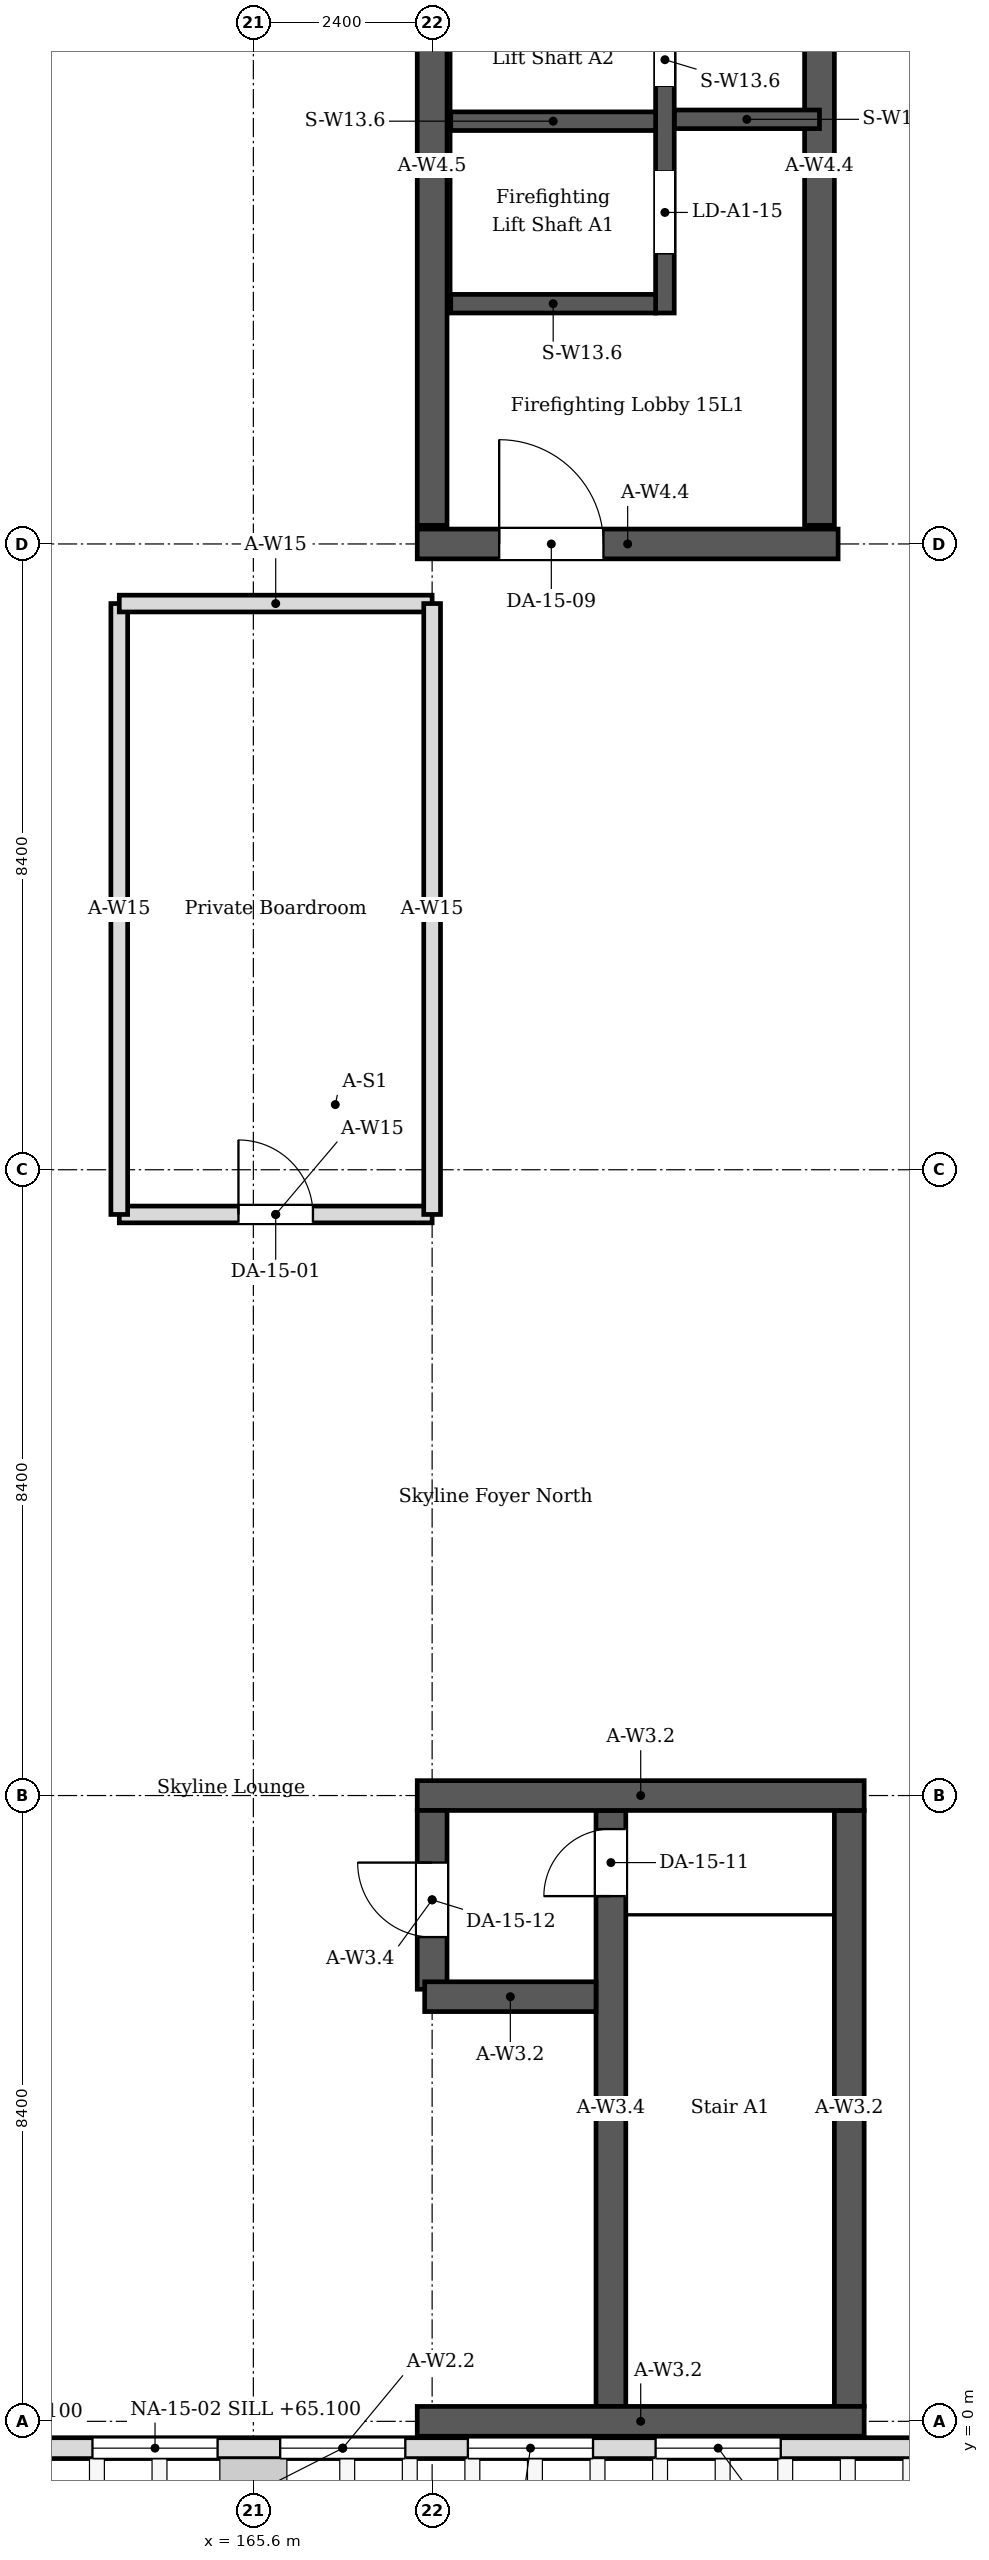
"""IFC4 building model, lengths in metres.
Left out: names, types, materials, properties, quantities, classifications, styles, units other than length and angle.
Written with IfcOpenShell. Run it as: python <this file> out.ifc"""

import sys

from ifc_helpers import new_model, si_unit, direction, frame, frame_2d, origin, place, context, subcontext, project, spatial, polyline, rectangle, outline, extrude, element, fill, save


model = new_model("IFC4")
c1 = context("Model", 3, precision=1e-05, world=origin(), true_north=direction((0.0, 1.0)))
c2 = subcontext(c1, "Body", "Model", "MODEL_VIEW")
j1 = project(units=[si_unit("LENGTHUNIT", "METRE"), si_unit("PLANEANGLEUNIT", "RADIAN")], contexts=[c1])
p1 = place(None, origin())
s1 = spatial("IfcSite", under=j1, at=p1, CompositionType="ELEMENT")
p2 = place(p1, origin())
s2 = spatial("IfcBuilding", under=s1, at=p2, CompositionType="ELEMENT")
p3 = place(p2, frame((0.0, 0.0, 64.8)))
s3 = spatial("IfcBuildingStorey", under=s2, at=p3, CompositionType="ELEMENT", Elevation=64.8)
p4 = place(p3, frame((157.0, -0.36, 0.0), z_axis=(0.0, 0.0, 1.0), x_axis=(1.0, 0.0, 0.0)))
e1 = element("IfcWall", 1, at=p4, inside=s3, PredefinedType="SOLIDWALL", context=c2, shape_type="SweptSolid", body=[
    extrude(outline(polyline([(0.0, 0.0), (19.6, 0.0), (19.6, 0.092), (17.967, 1.79), (16.333, 3.488), (14.7, 5.186), (13.067, 6.884), (11.433, 8.582), (9.8, 10.28), (8.167, 8.582), (6.533, 6.884), (4.9, 5.186), (3.267, 3.488), (1.633, 1.79), (0.0, 0.092), (0.0, 0.0)])), frame((0.0, 0.14, 0.0), z_axis=(0.0, -1.0, 0.0), x_axis=(1.0, 0.0, 0.0)), (0.0, 0.0, 1.0), 0.28),
])
p5 = place(p4, frame((3.92, 0.0, 0.3)))
e2 = element("IfcOpeningElement", 2, at=p5, cuts=e1, PredefinedType="OPENING", context=c2, shape_type="SweptSolid", body=[
    extrude(rectangle(XDim=1.68, YDim=3.5, at=frame_2d((0.84, 1.75))), frame((0.0, 0.15, 0.0), z_axis=(0.0, -1.0, 0.0), x_axis=(1.0, 0.0, 0.0)), (0.0, 0.0, 1.0), 0.3),
])
p6 = place(p4, frame((6.44, 0.0, 0.3)))
e3 = element("IfcOpeningElement", 3, at=p6, cuts=e1, PredefinedType="OPENING", context=c2, shape_type="SweptSolid", body=[
    extrude(rectangle(XDim=1.68, YDim=6.1, at=frame_2d((0.84, 3.05))), frame((0.0, 0.15, 0.0), z_axis=(0.0, -1.0, 0.0), x_axis=(1.0, 0.0, 0.0)), (0.0, 0.0, 1.0), 0.3),
])
p7 = place(p4, frame((8.96, 0.0, 0.3)))
e4 = element("IfcOpeningElement", 4, at=p7, cuts=e1, PredefinedType="OPENING", context=c2, shape_type="SweptSolid", body=[
    extrude(rectangle(XDim=1.68, YDim=8.8, at=frame_2d((0.84, 4.4))), frame((0.0, 0.15, 0.0), z_axis=(0.0, -1.0, 0.0), x_axis=(1.0, 0.0, 0.0)), (0.0, 0.0, 1.0), 0.3),
])
p8 = place(p4, frame((11.48, 0.0, 0.3)))
e5 = element("IfcOpeningElement", 5, at=p8, cuts=e1, PredefinedType="OPENING", context=c2, shape_type="SweptSolid", body=[
    extrude(rectangle(XDim=1.68, YDim=6.1, at=frame_2d((0.84, 3.05))), frame((0.0, 0.15, 0.0), z_axis=(0.0, -1.0, 0.0), x_axis=(1.0, 0.0, 0.0)), (0.0, 0.0, 1.0), 0.3),
])
p9 = place(p4, frame((14.0, 0.0, 0.3)))
e6 = element("IfcOpeningElement", 6, at=p9, cuts=e1, PredefinedType="OPENING", context=c2, shape_type="SweptSolid", body=[
    extrude(rectangle(XDim=1.68, YDim=3.5, at=frame_2d((0.84, 1.75))), frame((0.0, 0.15, 0.0), z_axis=(0.0, -1.0, 0.0), x_axis=(1.0, 0.0, 0.0)), (0.0, 0.0, 1.0), 0.3),
])
p10 = place(p3, frame((163.8, 16.2, 0.0), z_axis=(0.0, 0.0, 1.0), x_axis=(1.0, 0.0, 0.0)))
e7 = element("IfcWall", 7, at=p10, inside=s3, PredefinedType="PARTITIONING", context=c2, shape_type="SweptSolid", body=[
    extrude(rectangle(XDim=4.2, YDim=0.225, at=frame_2d((2.1, 0.0))), origin(), (0.0, 0.0, 1.0), 6.14),
])
p11 = place(p10, frame((1.6, 0.0, 0.0)))
e8 = element("IfcOpeningElement", 8, at=p11, cuts=e7, PredefinedType="OPENING", context=c2, shape_type="SweptSolid", body=[
    extrude(rectangle(XDim=1.0, YDim=2.1, at=frame_2d((0.5, 1.05))), frame((0.0, 0.123, 0.0), z_axis=(0.0, -1.0, 0.0), x_axis=(1.0, 0.0, 0.0)), (0.0, 0.0, 1.0), 0.245),
])
p12 = place(p3, frame((163.8, 16.2, 0.0), z_axis=(0.0, 0.0, 1.0), x_axis=(0.0, 1.0, 0.0)))
e9 = element("IfcWall", 9, at=p12, inside=s3, PredefinedType="PARTITIONING", context=c2, shape_type="SweptSolid", body=[
    extrude(rectangle(XDim=8.2, YDim=0.225, at=frame_2d((4.1, 0.0))), origin(), (0.0, 0.0, 1.0), 6.14),
])
p13 = place(p3, frame((163.8, 24.4, 0.0), z_axis=(0.0, 0.0, 1.0), x_axis=(1.0, 0.0, 0.0)))
e10 = element("IfcWall", 10, at=p13, inside=s3, PredefinedType="PARTITIONING", context=c2, shape_type="SweptSolid", body=[
    extrude(rectangle(XDim=4.2, YDim=0.225, at=frame_2d((2.1, 0.0))), origin(), (0.0, 0.0, 1.0), 6.14),
])
p14 = place(p3, frame((168.0, 16.2, 0.0), z_axis=(0.0, 0.0, 1.0), x_axis=(0.0, 1.0, 0.0)))
e11 = element("IfcWall", 11, at=p14, inside=s3, PredefinedType="PARTITIONING", context=c2, shape_type="SweptSolid", body=[
    extrude(rectangle(XDim=8.2, YDim=0.225, at=frame_2d((4.1, 0.0))), origin(), (0.0, 0.0, 1.0), 6.14),
])
p15 = place(p3, frame((167.8, 25.2, 0.0), z_axis=(0.0, 0.0, 1.0), x_axis=(1.0, 0.0, 0.0)))
e12 = element("IfcWall", 12, at=p15, inside=s3, PredefinedType="SOLIDWALL", context=c2, shape_type="SweptSolid", body=[
    extrude(rectangle(XDim=5.65, YDim=0.4, at=frame_2d((2.825, 0.0))), origin(), (0.0, 0.0, 1.0), 2.497),
])
p16 = place(p15, frame((1.1, 0.0, 0.0)))
e13 = element("IfcOpeningElement", 13, at=p16, cuts=e12, PredefinedType="OPENING", context=c2, shape_type="SweptSolid", body=[
    extrude(rectangle(XDim=1.4, YDim=2.1, at=frame_2d((0.7, 1.05))), frame((0.0, 0.21, 0.0), z_axis=(0.0, -1.0, 0.0), x_axis=(1.0, 0.0, 0.0)), (0.0, 0.0, 1.0), 0.42),
])
p17 = place(p3, frame((168.0, 25.45, 0.0), z_axis=(0.0, 0.0, 1.0), x_axis=(0.0, 1.0, 0.0)))
e14 = element("IfcWall", 14, at=p17, inside=s3, PredefinedType="SOLIDWALL", context=c2, shape_type="SweptSolid", body=[
    extrude(rectangle(XDim=16.3, YDim=0.4, at=frame_2d((8.15, 0.0))), origin(), (0.0, 0.0, 1.0), 4.324),
])
p18 = place(p3, frame((173.2, 25.45, 0.0), z_axis=(0.0, 0.0, 1.0), x_axis=(0.0, 1.0, 0.0)))
e15 = element("IfcWall", 15, at=p18, inside=s3, PredefinedType="SOLIDWALL", context=c2, shape_type="SweptSolid", body=[
    extrude(rectangle(XDim=16.3, YDim=0.4, at=frame_2d((8.15, 0.0))), origin(), (0.0, 0.0, 1.0), 2.497),
])
p19 = place(p3, frame((171.25, 30.9, 0.0), z_axis=(0.0, 0.0, 1.0), x_axis=(1.0, 0.0, 0.0)))
e16 = element("IfcWall", 16, at=p19, inside=s3, PredefinedType="SOLIDWALL", context=c2, shape_type="SweptSolid", body=[
    extrude(rectangle(XDim=1.95, YDim=0.25, at=frame_2d((0.975, 0.0))), origin(), (0.0, 0.0, 1.0), 2.497),
])
p20 = place(p3, frame((171.125, 28.3, 0.0), z_axis=(0.0, 0.0, 1.0), x_axis=(0.0, 1.0, 0.0)))
e17 = element("IfcWall", 17, at=p20, inside=s3, PredefinedType="SOLIDWALL", context=c2, shape_type="SweptSolid", body=[
    extrude(rectangle(XDim=10.9, YDim=0.25, at=frame_2d((5.45, 0.0))), origin(), (0.0, 0.0, 1.0), 4.324),
])
p21 = place(p20, frame((0.8, 0.0, 0.0)))
e18 = element("IfcOpeningElement", 18, at=p21, cuts=e17, PredefinedType="OPENING", context=c2, shape_type="SweptSolid", body=[
    extrude(rectangle(XDim=1.1, YDim=2.1, at=frame_2d((0.55, 1.05))), frame((0.0, 0.135, 0.0), z_axis=(0.0, -1.0, 0.0), x_axis=(1.0, 0.0, 0.0)), (0.0, 0.0, 1.0), 0.27),
])
p22 = place(p20, frame((3.05, 0.0, 0.0)))
e19 = element("IfcOpeningElement", 19, at=p22, cuts=e17, PredefinedType="OPENING", context=c2, shape_type="SweptSolid", body=[
    extrude(rectangle(XDim=1.1, YDim=2.1, at=frame_2d((0.55, 1.05))), frame((0.0, 0.135, 0.0), z_axis=(0.0, -1.0, 0.0), x_axis=(1.0, 0.0, 0.0)), (0.0, 0.0, 1.0), 0.27),
])
p23 = place(p20, frame((5.1, 0.0, 0.0)))
e20 = element("IfcOpeningElement", 20, at=p23, cuts=e17, PredefinedType="OPENING", context=c2, shape_type="SweptSolid", body=[
    extrude(rectangle(XDim=1.1, YDim=2.1, at=frame_2d((0.55, 1.05))), frame((0.0, 0.135, 0.0), z_axis=(0.0, -1.0, 0.0), x_axis=(1.0, 0.0, 0.0)), (0.0, 0.0, 1.0), 0.27),
])
p24 = place(p20, frame((7.15, 0.0, 0.0)))
e21 = element("IfcOpeningElement", 21, at=p24, cuts=e17, PredefinedType="OPENING", context=c2, shape_type="SweptSolid", body=[
    extrude(rectangle(XDim=1.1, YDim=2.1, at=frame_2d((0.55, 1.05))), frame((0.0, 0.135, 0.0), z_axis=(0.0, -1.0, 0.0), x_axis=(1.0, 0.0, 0.0)), (0.0, 0.0, 1.0), 0.27),
])
p25 = place(p20, frame((9.2, 0.0, 0.0)))
e22 = element("IfcOpeningElement", 22, at=p25, cuts=e17, PredefinedType="OPENING", context=c2, shape_type="SweptSolid", body=[
    extrude(rectangle(XDim=1.1, YDim=2.1, at=frame_2d((0.55, 1.05))), frame((0.0, 0.135, 0.0), z_axis=(0.0, -1.0, 0.0), x_axis=(1.0, 0.0, 0.0)), (0.0, 0.0, 1.0), 0.27),
])
for number, where, z_axis, x_axis in (
    (23, (168.25, 28.425, 0.0), (0.0, 0.0, 1.0), (1.0, 0.0, 0.0)),
    (24, (168.25, 30.875, 0.0), (0.0, 0.0, 1.0), (1.0, 0.0, 0.0)),
):
    element("IfcWall", number, at=place(p3, frame(where, z_axis=z_axis, x_axis=x_axis)), inside=s3, PredefinedType="SOLIDWALL", context=c2, shape_type="SweptSolid", body=[
        extrude(rectangle(XDim=2.75, YDim=0.25, at=frame_2d((1.375, 0.0))), origin(), (0.0, 0.0, 1.0), 4.324),
    ])
p26 = place(p3, frame((170.4, 0.2, 0.0), z_axis=(0.0, 0.0, 1.0), x_axis=(0.0, 1.0, 0.0)))
e25 = element("IfcWall", 25, at=p26, inside=s3, PredefinedType="SOLIDWALL", context=c2, shape_type="SweptSolid", body=[
    extrude(rectangle(XDim=8.0, YDim=0.4, at=frame_2d((4.0, 0.0))), origin(), (0.0, 0.0, 1.0), 5.2),
])
p27 = place(p26, frame((6.85, 0.0, 0.0)))
e26 = element("IfcOpeningElement", 26, at=p27, cuts=e25, PredefinedType="OPENING", context=c2, shape_type="SweptSolid", body=[
    extrude(rectangle(XDim=0.9, YDim=2.1, at=frame_2d((0.45, 1.05))), frame((0.0, 0.21, 0.0), z_axis=(0.0, -1.0, 0.0), x_axis=(1.0, 0.0, 0.0)), (0.0, 0.0, 1.0), 0.42),
])
p28 = place(p3, frame((173.6, 0.2, 0.0), z_axis=(0.0, 0.0, 1.0), x_axis=(0.0, 1.0, 0.0)))
e27 = element("IfcWall", 27, at=p28, inside=s3, PredefinedType="SOLIDWALL", context=c2, shape_type="SweptSolid", body=[
    extrude(rectangle(XDim=8.0, YDim=0.4, at=frame_2d((4.0, 0.0))), origin(), (0.0, 0.0, 1.0), 1.873),
])
for number, where, z_axis, x_axis in (
    (28, (167.8, 0.0, 0.0), (0.0, 0.0, 1.0), (1.0, 0.0, 0.0)),
    (29, (167.8, 8.4, 0.0), (0.0, 0.0, 1.0), (1.0, 0.0, 0.0)),
):
    element("IfcWall", number, at=place(p3, frame(where, z_axis=z_axis, x_axis=x_axis)), inside=s3, PredefinedType="SOLIDWALL", context=c2, shape_type="SweptSolid", body=[
        extrude(rectangle(XDim=6.0, YDim=0.4, at=frame_2d((3.0, 0.0))), origin(), (0.0, 0.0, 1.0), 1.873),
    ])
p29 = place(p3, frame((168.0, 5.8, 0.0), z_axis=(0.0, 0.0, 1.0), x_axis=(0.0, 1.0, 0.0)))
e30 = element("IfcWall", 30, at=p29, inside=s3, PredefinedType="SOLIDWALL", context=c2, shape_type="SweptSolid", body=[
    extrude(rectangle(XDim=2.4, YDim=0.4, at=frame_2d((1.2, 0.0))), origin(), (0.0, 0.0, 1.0), 5.2),
])
p30 = place(p29, frame((0.7, 0.0, 0.0)))
e31 = element("IfcOpeningElement", 31, at=p30, cuts=e30, PredefinedType="OPENING", context=c2, shape_type="SweptSolid", body=[
    extrude(rectangle(XDim=1.0, YDim=2.1, at=frame_2d((0.5, 1.05))), frame((0.0, 0.21, 0.0), z_axis=(0.0, -1.0, 0.0), x_axis=(1.0, 0.0, 0.0)), (0.0, 0.0, 1.0), 0.42),
])
p31 = place(p3, frame((167.9, 5.7, 0.0), z_axis=(0.0, 0.0, 1.0), x_axis=(1.0, 0.0, 0.0)))
e32 = element("IfcWall", 32, at=p31, inside=s3, PredefinedType="SOLIDWALL", context=c2, shape_type="SweptSolid", body=[
    extrude(rectangle(XDim=2.3, YDim=0.4, at=frame_2d((1.15, 0.0))), origin(), (0.0, 0.0, 1.0), 1.873),
])
p32 = place(p6, origin())
e33 = element("IfcWindow", 33, at=p32, inside=s3, PartitioningType="SINGLE_PANEL", PredefinedType="WINDOW", context=c2, shape_type="SweptSolid", body=[
    extrude(rectangle(XDim=1.68, YDim=6.1, at=frame_2d((0.84, 3.05))), frame((0.0, 0.03, 0.0), z_axis=(0.0, -1.0, 0.0), x_axis=(1.0, 0.0, 0.0)), (0.0, 0.0, 1.0), 0.06),
])
fill(e3, e33)
p33 = place(p7, origin())
e34 = element("IfcWindow", 34, at=p33, inside=s3, PartitioningType="SINGLE_PANEL", PredefinedType="WINDOW", context=c2, shape_type="SweptSolid", body=[
    extrude(rectangle(XDim=1.68, YDim=8.8, at=frame_2d((0.84, 4.4))), frame((0.0, 0.03, 0.0), z_axis=(0.0, -1.0, 0.0), x_axis=(1.0, 0.0, 0.0)), (0.0, 0.0, 1.0), 0.06),
])
fill(e4, e34)
p34 = place(p8, origin())
e35 = element("IfcWindow", 35, at=p34, inside=s3, PartitioningType="SINGLE_PANEL", PredefinedType="WINDOW", context=c2, shape_type="SweptSolid", body=[
    extrude(rectangle(XDim=1.68, YDim=6.1, at=frame_2d((0.84, 3.05))), frame((0.0, 0.03, 0.0), z_axis=(0.0, -1.0, 0.0), x_axis=(1.0, 0.0, 0.0)), (0.0, 0.0, 1.0), 0.06),
])
fill(e5, e35)
p35 = place(p9, origin())
e36 = element("IfcWindow", 36, at=p35, inside=s3, PartitioningType="SINGLE_PANEL", PredefinedType="WINDOW", context=c2, shape_type="SweptSolid", body=[
    extrude(rectangle(XDim=1.68, YDim=3.5, at=frame_2d((0.84, 1.75))), frame((0.0, 0.03, 0.0), z_axis=(0.0, -1.0, 0.0), x_axis=(1.0, 0.0, 0.0)), (0.0, 0.0, 1.0), 0.06),
])
fill(e6, e36)
p36 = place(p11, origin())
e37 = element("IfcDoor", 37, at=p36, inside=s3, OperationType="SINGLE_SWING_LEFT", PredefinedType="DOOR", context=c2, shape_type="SweptSolid", body=[
    extrude(rectangle(XDim=1.0, YDim=2.1, at=frame_2d((0.5, 1.05))), frame((0.0, 0.025, 0.0), z_axis=(0.0, -1.0, 0.0), x_axis=(1.0, 0.0, 0.0)), (0.0, 0.0, 1.0), 0.05),
])
fill(e8, e37)
p37 = place(p21, origin())
e38 = element("IfcDoor", 38, at=p37, inside=s3, OperationType="SLIDING_TO_LEFT", PredefinedType="DOOR", context=c2, shape_type="SweptSolid", body=[
    extrude(rectangle(XDim=1.1, YDim=2.1, at=frame_2d((0.55, 1.05))), frame((0.0, 0.025, 0.0), z_axis=(0.0, -1.0, 0.0), x_axis=(1.0, 0.0, 0.0)), (0.0, 0.0, 1.0), 0.05),
])
fill(e18, e38)
p38 = place(p22, origin())
e39 = element("IfcDoor", 39, at=p38, inside=s3, OperationType="SLIDING_TO_LEFT", PredefinedType="DOOR", context=c2, shape_type="SweptSolid", body=[
    extrude(rectangle(XDim=1.1, YDim=2.1, at=frame_2d((0.55, 1.05))), frame((0.0, 0.025, 0.0), z_axis=(0.0, -1.0, 0.0), x_axis=(1.0, 0.0, 0.0)), (0.0, 0.0, 1.0), 0.05),
])
fill(e19, e39)
p39 = place(p16, origin())
e40 = element("IfcDoor", 40, at=p39, inside=s3, OperationType="DOUBLE_DOOR_DOUBLE_SWING", PredefinedType="DOOR", context=c2, shape_type="SweptSolid", body=[
    extrude(rectangle(XDim=1.4, YDim=2.1, at=frame_2d((0.7, 1.05))), frame((0.0, 0.025, 0.0), z_axis=(0.0, -1.0, 0.0), x_axis=(1.0, 0.0, 0.0)), (0.0, 0.0, 1.0), 0.05),
])
fill(e13, e40)
p40 = place(p27, origin())
e41 = element("IfcDoor", 41, at=p40, inside=s3, OperationType="SINGLE_SWING_LEFT", PredefinedType="DOOR", context=c2, shape_type="SweptSolid", body=[
    extrude(rectangle(XDim=0.9, YDim=2.1, at=frame_2d((0.45, 1.05))), frame((0.0, 0.025, 0.0), z_axis=(0.0, -1.0, 0.0), x_axis=(1.0, 0.0, 0.0)), (0.0, 0.0, 1.0), 0.05),
])
fill(e26, e41)
p41 = place(p30, origin())
e42 = element("IfcDoor", 42, at=p41, inside=s3, OperationType="SINGLE_SWING_RIGHT", PredefinedType="DOOR", context=c2, shape_type="SweptSolid", body=[
    extrude(rectangle(XDim=1.0, YDim=2.1, at=frame_2d((0.5, 1.05))), frame((0.0, 0.025, 0.0), z_axis=(0.0, -1.0, 0.0), x_axis=(1.0, 0.0, 0.0)), (0.0, 0.0, 1.0), 0.05),
])
fill(e31, e42)
save(model, sys.argv[1])
